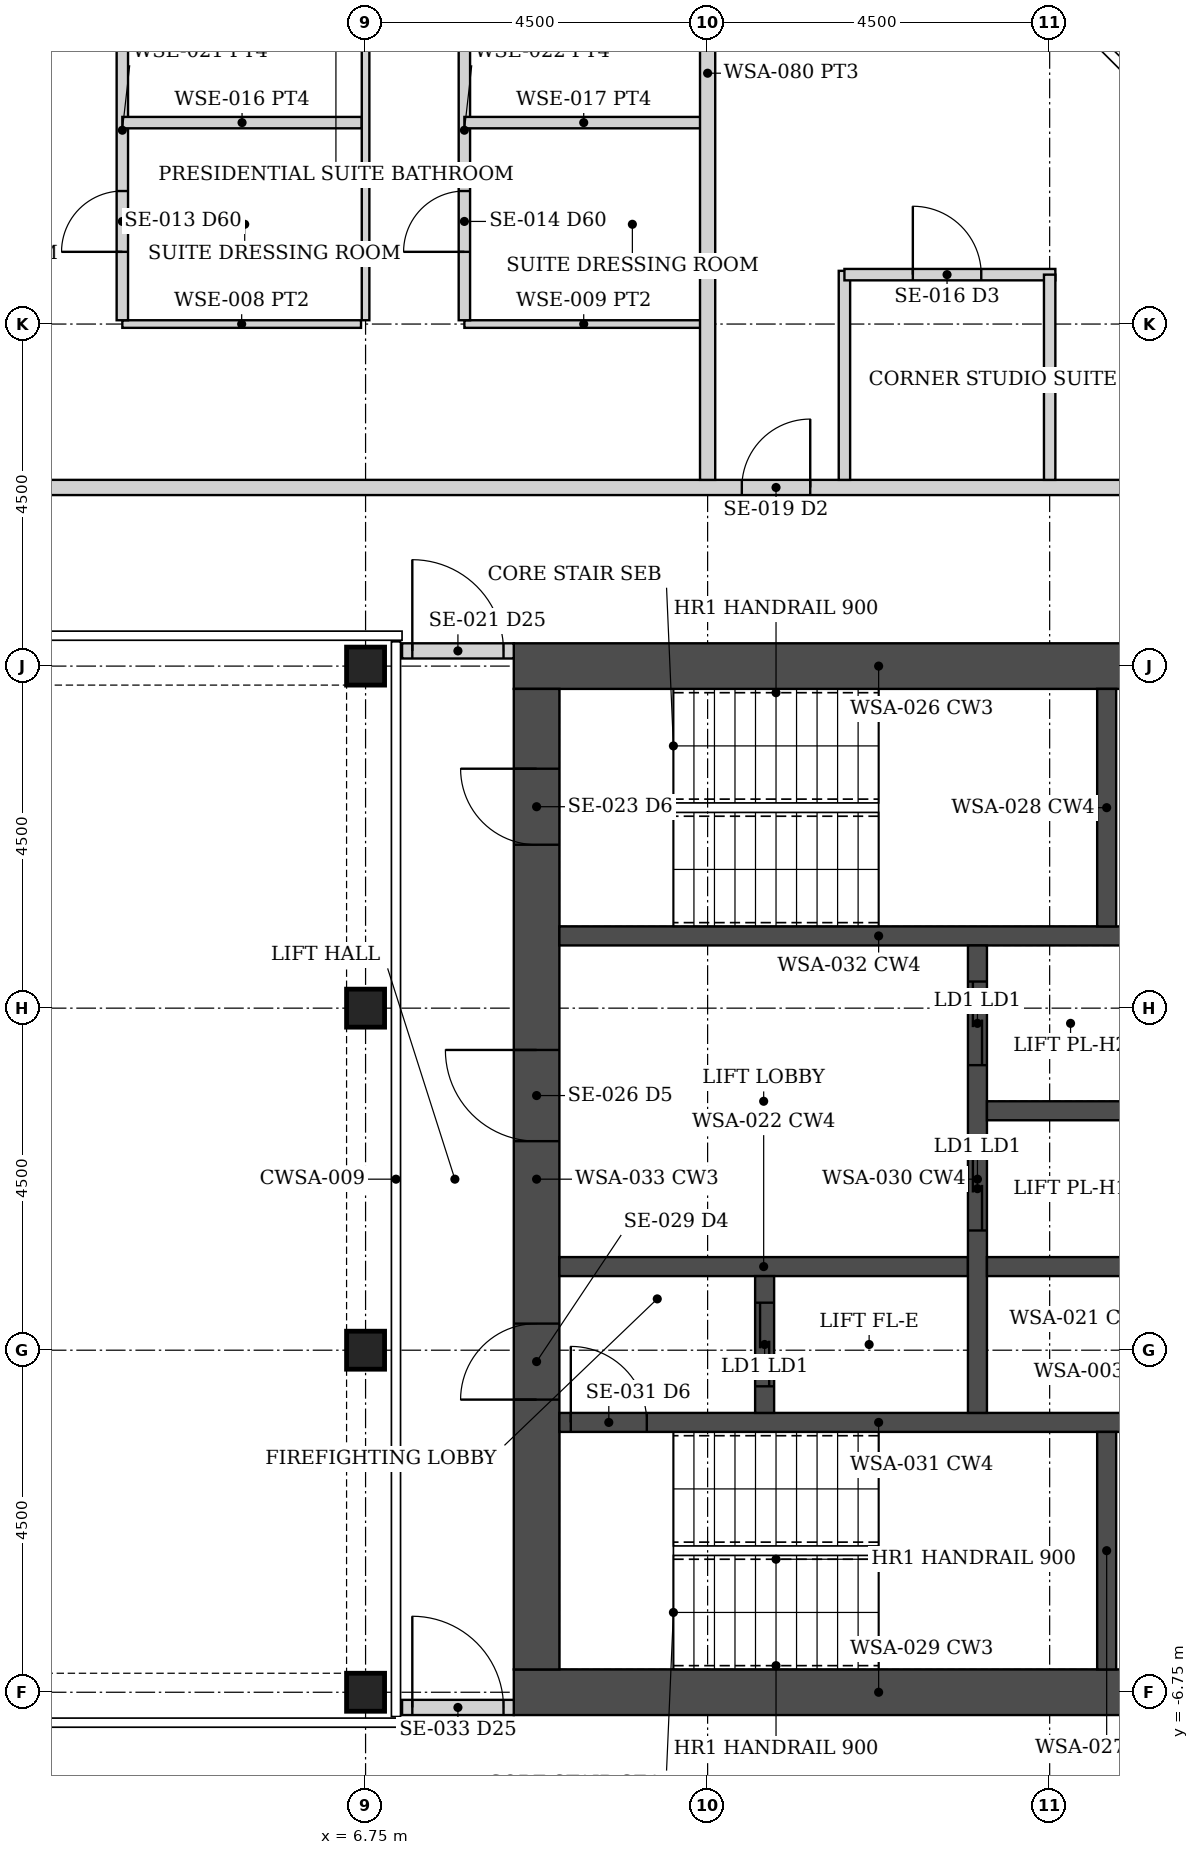
"""IFC4 building model, lengths in metres.
Left out: names, types, materials, properties, quantities, classifications, styles, units other than length and angle.
Written with IfcOpenShell. Run it as: python <this file> out.ifc"""

import sys

from ifc_helpers import new_model, si_unit, direction, frame, frame_2d, origin, origin_2d, place, context, subcontext, project, spatial, rectangle, hollow_rectangle, extrude, element, fill, save


model = new_model("IFC4")
c1 = context("Model", 3, precision=1e-05, world=origin(), true_north=direction((0.0, 1.0)))
c2 = subcontext(c1, "Body", "Model", "MODEL_VIEW")
j1 = project(units=[si_unit("LENGTHUNIT", "METRE"), si_unit("PLANEANGLEUNIT", "RADIAN")], contexts=[c1])
p1 = place(None, origin())
s1 = spatial("IfcSite", under=j1, at=p1, CompositionType="ELEMENT")
p2 = place(p1, origin())
s2 = spatial("IfcBuilding", under=s1, at=p2, CompositionType="ELEMENT")
p3 = place(p2, frame((0.0, 0.0, 245.8)))
s3 = spatial("IfcBuildingStorey", under=s2, at=p3, CompositionType="ELEMENT", Elevation=245.8)
for number, where, z_axis, x_axis in (
    (1, (6.75, -6.75, 0.0), (0.0, 0.0, 1.0), (1.0, 0.0, 0.0)),
    (2, (6.75, -2.25, 0.0), (0.0, 0.0, 1.0), (1.0, 0.0, 0.0)),
    (3, (6.75, 2.25, 0.0), (0.0, 0.0, 1.0), (1.0, 0.0, 0.0)),
    (4, (6.75, 6.75, 0.0), (0.0, 0.0, 1.0), (1.0, 0.0, 0.0)),
):
    element("IfcColumn", number, at=place(p3, frame(where, z_axis=z_axis, x_axis=x_axis)), inside=s3, PredefinedType="COLUMN", context=c2, shape_type="SweptSolid", body=[
        extrude(hollow_rectangle(XDim=0.5, YDim=0.5, WallThickness=0.025, at=origin_2d()), origin(), (0.0, 0.0, 1.0), 3.75),
    ])
for number, where, z_axis, x_axis in (
    (5, (8.7, -6.75, 0.0), (0.0, 0.0, 1.0), (1.0, 0.0, 0.0)),
    (6, (8.7, 6.75, 0.0), (0.0, 0.0, 1.0), (1.0, 0.0, 0.0)),
):
    element("IfcWall", number, at=place(p3, frame(where, z_axis=z_axis, x_axis=x_axis)), inside=s3, PredefinedType="SHEAR", context=c2, shape_type="SweptSolid", body=[
        extrude(rectangle(XDim=9.6, YDim=0.6, at=frame_2d((4.8, 0.0))), origin(), (0.0, 0.0, 1.0), 3.75),
    ])
p4 = place(p3, frame((9.0, -6.45, 0.0), z_axis=(0.0, 0.0, 1.0), x_axis=(0.0, 1.0, 0.0)))
e7 = element("IfcWall", 7, at=p4, inside=s3, PredefinedType="SHEAR", context=c2, shape_type="SweptSolid", body=[
    extrude(rectangle(XDim=12.9, YDim=0.6, at=frame_2d((6.45, 0.0))), origin(), (0.0, 0.0, 1.0), 3.75),
])
p5 = place(p4, frame((3.55, 0.0, 0.0)))
e8 = element("IfcOpeningElement", 8, at=p5, cuts=e7, PredefinedType="OPENING", context=c2, shape_type="SweptSolid", body=[
    extrude(rectangle(XDim=1.0, YDim=2.1, at=frame_2d((0.5, 1.05))), frame((0.0, 0.31, 0.0), z_axis=(0.0, -1.0, 0.0), x_axis=(1.0, 0.0, 0.0)), (0.0, 0.0, 1.0), 0.62),
])
p6 = place(p4, frame((6.95, 0.0, 0.0)))
e9 = element("IfcOpeningElement", 9, at=p6, cuts=e7, PredefinedType="OPENING", context=c2, shape_type="SweptSolid", body=[
    extrude(rectangle(XDim=1.2, YDim=2.1, at=frame_2d((0.6, 1.05))), frame((0.0, 0.31, 0.0), z_axis=(0.0, -1.0, 0.0), x_axis=(1.0, 0.0, 0.0)), (0.0, 0.0, 1.0), 0.62),
])
p7 = place(p4, frame((10.85, 0.0, 0.0)))
e10 = element("IfcOpeningElement", 10, at=p7, cuts=e7, PredefinedType="OPENING", context=c2, shape_type="SweptSolid", body=[
    extrude(rectangle(XDim=1.0, YDim=2.1, at=frame_2d((0.5, 1.05))), frame((0.0, 0.31, 0.0), z_axis=(0.0, -1.0, 0.0), x_axis=(1.0, 0.0, 0.0)), (0.0, 0.0, 1.0), 0.62),
])
p8 = place(p3, frame((9.3, -3.2, 0.0), z_axis=(0.0, 0.0, 1.0), x_axis=(1.0, 0.0, 0.0)))
e11 = element("IfcWall", 11, at=p8, inside=s3, PredefinedType="SHEAR", context=c2, shape_type="SweptSolid", body=[
    extrude(rectangle(XDim=8.4, YDim=0.25, at=frame_2d((4.2, 0.0))), origin(), (0.0, 0.0, 1.0), 3.75),
])
p9 = place(p8, frame((0.15, 0.0, 0.0)))
e12 = element("IfcOpeningElement", 12, at=p9, cuts=e11, PredefinedType="OPENING", context=c2, shape_type="SweptSolid", body=[
    extrude(rectangle(XDim=1.0, YDim=2.1, at=frame_2d((0.5, 1.05))), frame((0.0, 0.135, 0.0), z_axis=(0.0, -1.0, 0.0), x_axis=(1.0, 0.0, 0.0)), (0.0, 0.0, 1.0), 0.27),
])
p10 = place(p3, frame((9.3, 3.2, 0.0), z_axis=(0.0, 0.0, 1.0), x_axis=(1.0, 0.0, 0.0)))
e13 = element("IfcWall", 13, at=p10, inside=s3, PredefinedType="SHEAR", context=c2, shape_type="SweptSolid", body=[
    extrude(rectangle(XDim=8.4, YDim=0.25, at=frame_2d((4.2, 0.0))), origin(), (0.0, 0.0, 1.0), 3.75),
])
for number, where, z_axis, x_axis in (
    (14, (16.5, -6.45, 0.0), (0.0, 0.0, 1.0), (0.0, 1.0, 0.0)),
    (15, (16.5, 3.325, 0.0), (0.0, 0.0, 1.0), (0.0, 1.0, 0.0)),
):
    element("IfcWall", number, at=place(p3, frame(where, z_axis=z_axis, x_axis=x_axis)), inside=s3, PredefinedType="SHEAR", context=c2, shape_type="SweptSolid", body=[
        extrude(rectangle(XDim=3.125, YDim=0.25, at=frame_2d((1.562, 0.0))), origin(), (0.0, 0.0, 1.0), 3.75),
    ])
p11 = place(p3, frame((9.3, -1.15, 0.0), z_axis=(0.0, 0.0, 1.0), x_axis=(1.0, 0.0, 0.0)))
e16 = element("IfcWall", 16, at=p11, inside=s3, PredefinedType="SHEAR", context=c2, shape_type="SweptSolid", body=[
    extrude(rectangle(XDim=5.375, YDim=0.25, at=frame_2d((2.688, 0.0))), origin(), (0.0, 0.0, 1.0), 3.75),
])
p12 = place(p3, frame((12.0, -3.075, 0.0), z_axis=(0.0, 0.0, 1.0), x_axis=(0.0, 1.0, 0.0)))
e17 = element("IfcWall", 17, at=p12, inside=s3, PredefinedType="SHEAR", context=c2, shape_type="SweptSolid", body=[
    extrude(rectangle(XDim=1.8, YDim=0.25, at=frame_2d((0.9, 0.0))), origin(), (0.0, 0.0, 1.0), 3.75),
])
p13 = place(p12, frame((0.35, 0.0, 0.0)))
e18 = element("IfcOpeningElement", 18, at=p13, cuts=e17, PredefinedType="OPENING", context=c2, shape_type="SweptSolid", body=[
    extrude(rectangle(XDim=1.1, YDim=2.1, at=frame_2d((0.55, 1.05))), frame((0.0, 0.135, 0.0), z_axis=(0.0, -1.0, 0.0), x_axis=(1.0, 0.0, 0.0)), (0.0, 0.0, 1.0), 0.27),
])
p14 = place(p3, frame((14.8, -3.075, 0.0), z_axis=(0.0, 0.0, 1.0), x_axis=(0.0, 1.0, 0.0)))
e19 = element("IfcWall", 19, at=p14, inside=s3, PredefinedType="SHEAR", context=c2, shape_type="SweptSolid", body=[
    extrude(rectangle(XDim=6.15, YDim=0.25, at=frame_2d((3.075, 0.0))), origin(), (0.0, 0.0, 1.0), 3.75),
])
p15 = place(p14, frame((2.4, 0.0, 0.0)))
e20 = element("IfcOpeningElement", 20, at=p15, cuts=e19, PredefinedType="OPENING", context=c2, shape_type="SweptSolid", body=[
    extrude(rectangle(XDim=1.1, YDim=2.1, at=frame_2d((0.55, 1.05))), frame((0.0, 0.135, 0.0), z_axis=(0.0, -1.0, 0.0), x_axis=(1.0, 0.0, 0.0)), (0.0, 0.0, 1.0), 0.27),
])
p16 = place(p14, frame((4.575, 0.0, 0.0)))
e21 = element("IfcOpeningElement", 21, at=p16, cuts=e19, PredefinedType="OPENING", context=c2, shape_type="SweptSolid", body=[
    extrude(rectangle(XDim=1.1, YDim=2.1, at=frame_2d((0.55, 1.05))), frame((0.0, 0.135, 0.0), z_axis=(0.0, -1.0, 0.0), x_axis=(1.0, 0.0, 0.0)), (0.0, 0.0, 1.0), 0.27),
])
for number, where, z_axis, x_axis in (
    (22, (14.925, -1.15, 0.0), (0.0, 0.0, 1.0), (1.0, 0.0, 0.0)),
    (23, (14.925, 0.9, 0.0), (0.0, 0.0, 1.0), (1.0, 0.0, 0.0)),
):
    element("IfcWall", number, at=place(p3, frame(where, z_axis=z_axis, x_axis=x_axis)), inside=s3, PredefinedType="SHEAR", context=c2, shape_type="SweptSolid", body=[
        extrude(rectangle(XDim=2.775, YDim=0.25, at=frame_2d((1.387, 0.0))), origin(), (0.0, 0.0, 1.0), 3.75),
    ])
p17 = place(p3, frame((7.23, 6.95, 0.0), z_axis=(0.0, 0.0, 1.0), x_axis=(1.0, 0.0, 0.0)))
e24 = element("IfcWall", 24, at=p17, inside=s3, PredefinedType="PARTITIONING", context=c2, shape_type="SweptSolid", body=[
    extrude(rectangle(XDim=1.47, YDim=0.2, at=frame_2d((0.735, 0.0))), origin(), (0.0, 0.0, 1.0), 2.629),
])
p18 = place(p17, frame((0.135, 0.0, 0.0)))
e25 = element("IfcOpeningElement", 25, at=p18, cuts=e24, PredefinedType="OPENING", context=c2, shape_type="SweptSolid", body=[
    extrude(rectangle(XDim=1.2, YDim=2.1, at=frame_2d((0.6, 1.05))), frame((0.0, 0.11, 0.0), z_axis=(0.0, -1.0, 0.0), x_axis=(1.0, 0.0, 0.0)), (0.0, 0.0, 1.0), 0.22),
])
p19 = place(p3, frame((7.23, -6.95, 0.0), z_axis=(0.0, 0.0, 1.0), x_axis=(1.0, 0.0, 0.0)))
e26 = element("IfcWall", 26, at=p19, inside=s3, PredefinedType="PARTITIONING", context=c2, shape_type="SweptSolid", body=[
    extrude(rectangle(XDim=1.47, YDim=0.2, at=frame_2d((0.735, 0.0))), origin(), (0.0, 0.0, 1.0), 2.629),
])
p20 = place(p19, frame((0.135, 0.0, 0.0)))
e27 = element("IfcOpeningElement", 27, at=p20, cuts=e26, PredefinedType="OPENING", context=c2, shape_type="SweptSolid", body=[
    extrude(rectangle(XDim=1.2, YDim=2.1, at=frame_2d((0.6, 1.05))), frame((0.0, 0.11, 0.0), z_axis=(0.0, -1.0, 0.0), x_axis=(1.0, 0.0, 0.0)), (0.0, 0.0, 1.0), 0.22),
])
p21 = place(p3, frame((-20.05, 9.1, 0.0), z_axis=(0.0, 0.0, 1.0), x_axis=(1.0, 0.0, 0.0)))
e28 = element("IfcWall", 28, at=p21, inside=s3, PredefinedType="PARTITIONING", context=c2, shape_type="SweptSolid", body=[
    extrude(rectangle(XDim=40.1, YDim=0.2, at=frame_2d((20.05, 0.0))), origin(), (0.0, 0.0, 1.0), 2.629),
])
p22 = place(p21, frame((9.1, 0.0, 0.0)))
e29 = element("IfcOpeningElement", 29, at=p22, cuts=e28, PredefinedType="OPENING", context=c2, shape_type="SweptSolid", body=[
    extrude(rectangle(XDim=0.9, YDim=2.1, at=frame_2d((0.45, 1.05))), frame((0.0, 0.11, 0.0), z_axis=(0.0, -1.0, 0.0), x_axis=(1.0, 0.0, 0.0)), (0.0, 0.0, 1.0), 0.22),
])
p23 = place(p21, frame((31.75, 0.0, 0.0)))
e30 = element("IfcOpeningElement", 30, at=p23, cuts=e28, PredefinedType="OPENING", context=c2, shape_type="SweptSolid", body=[
    extrude(rectangle(XDim=0.9, YDim=2.1, at=frame_2d((0.45, 1.05))), frame((0.0, 0.11, 0.0), z_axis=(0.0, -1.0, 0.0), x_axis=(1.0, 0.0, 0.0)), (0.0, 0.0, 1.0), 0.22),
])
p24 = place(p21, frame((7.45, 0.0, 0.0)))
e31 = element("IfcOpeningElement", 31, at=p24, cuts=e28, PredefinedType="OPENING", context=c2, shape_type="SweptSolid", body=[
    extrude(rectangle(XDim=0.9, YDim=2.1, at=frame_2d((0.45, 1.05))), frame((0.0, 0.11, 0.0), z_axis=(0.0, -1.0, 0.0), x_axis=(1.0, 0.0, 0.0)), (0.0, 0.0, 1.0), 0.22),
])
p25 = place(p3, frame((3.55, 11.25, 0.0), z_axis=(0.0, 0.0, 1.0), x_axis=(1.0, 0.0, 0.0)))
e32 = element("IfcWall", 32, at=p25, inside=s3, PredefinedType="PARTITIONING", context=c2, shape_type="SweptSolid", body=[
    extrude(rectangle(XDim=3.14, YDim=0.1, at=frame_2d((1.57, 0.0))), origin(), (0.0, 0.0, 1.0), 2.629),
])
p26 = place(p3, frame((3.55, 11.3, 0.0), z_axis=(0.0, 0.0, 1.0), x_axis=(0.0, 1.0, 0.0)))
e33 = element("IfcWall", 33, at=p26, inside=s3, PredefinedType="PARTITIONING", context=c2, shape_type="SweptSolid", body=[
    extrude(rectangle(XDim=5.0, YDim=0.15, at=frame_2d((2.5, 0.0))), origin(), (0.0, 0.0, 1.0), 2.629),
])
p27 = place(p26, frame((0.9, 0.0, 0.0)))
e34 = element("IfcOpeningElement", 34, at=p27, cuts=e33, PredefinedType="OPENING", context=c2, shape_type="SweptSolid", body=[
    extrude(rectangle(XDim=0.8, YDim=2.1, at=frame_2d((0.4, 1.05))), frame((0.0, 0.085, 0.0), z_axis=(0.0, -1.0, 0.0), x_axis=(1.0, 0.0, 0.0)), (0.0, 0.0, 1.0), 0.17),
])
p28 = place(p3, frame((3.55, 13.9, 0.0), z_axis=(0.0, 0.0, 1.0), x_axis=(1.0, 0.0, 0.0)))
e35 = element("IfcWall", 35, at=p28, inside=s3, PredefinedType="PARTITIONING", context=c2, shape_type="SweptSolid", body=[
    extrude(rectangle(XDim=3.15, YDim=0.15, at=frame_2d((1.575, 0.0))), origin(), (0.0, 0.0, 1.0), 2.629),
])
p29 = place(p3, frame((6.75, 11.3, 0.0), z_axis=(0.0, 0.0, 1.0), x_axis=(0.0, 1.0, 0.0)))
e36 = element("IfcWall", 36, at=p29, inside=s3, PredefinedType="PARTITIONING", context=c2, shape_type="SweptSolid", body=[
    extrude(rectangle(XDim=8.6, YDim=0.1, at=frame_2d((4.3, 0.0))), origin(), (0.0, 0.0, 1.0), 2.629),
])
p30 = place(p3, frame((8.05, 11.25, 0.0), z_axis=(0.0, 0.0, 1.0), x_axis=(1.0, 0.0, 0.0)))
e37 = element("IfcWall", 37, at=p30, inside=s3, PredefinedType="PARTITIONING", context=c2, shape_type="SweptSolid", body=[
    extrude(rectangle(XDim=3.14, YDim=0.1, at=frame_2d((1.57, 0.0))), origin(), (0.0, 0.0, 1.0), 2.629),
])
p31 = place(p3, frame((8.05, 11.3, 0.0), z_axis=(0.0, 0.0, 1.0), x_axis=(0.0, 1.0, 0.0)))
e38 = element("IfcWall", 38, at=p31, inside=s3, PredefinedType="PARTITIONING", context=c2, shape_type="SweptSolid", body=[
    extrude(rectangle(XDim=5.0, YDim=0.15, at=frame_2d((2.5, 0.0))), origin(), (0.0, 0.0, 1.0), 2.629),
])
p32 = place(p31, frame((0.9, 0.0, 0.0)))
e39 = element("IfcOpeningElement", 39, at=p32, cuts=e38, PredefinedType="OPENING", context=c2, shape_type="SweptSolid", body=[
    extrude(rectangle(XDim=0.8, YDim=2.1, at=frame_2d((0.4, 1.05))), frame((0.0, 0.085, 0.0), z_axis=(0.0, -1.0, 0.0), x_axis=(1.0, 0.0, 0.0)), (0.0, 0.0, 1.0), 0.17),
])
p33 = place(p3, frame((8.05, 13.9, 0.0), z_axis=(0.0, 0.0, 1.0), x_axis=(1.0, 0.0, 0.0)))
e40 = element("IfcWall", 40, at=p33, inside=s3, PredefinedType="PARTITIONING", context=c2, shape_type="SweptSolid", body=[
    extrude(rectangle(XDim=3.14, YDim=0.15, at=frame_2d((1.57, 0.0))), origin(), (0.0, 0.0, 1.0), 2.629),
])
p34 = place(p3, frame((11.25, 9.2, 0.0), z_axis=(0.0, 0.0, 1.0), x_axis=(0.0, 1.0, 0.0)))
e41 = element("IfcWall", 41, at=p34, inside=s3, PredefinedType="PARTITIONING", context=c2, shape_type="SweptSolid", body=[
    extrude(rectangle(XDim=10.7, YDim=0.2, at=frame_2d((5.35, 0.0))), origin(), (0.0, 0.0, 1.0), 2.629),
])
p35 = place(p3, frame((13.05, 9.2, 0.0), z_axis=(0.0, 0.0, 1.0), x_axis=(0.0, 1.0, 0.0)))
e42 = element("IfcWall", 42, at=p35, inside=s3, PredefinedType="PARTITIONING", context=c2, shape_type="SweptSolid", body=[
    extrude(rectangle(XDim=2.75, YDim=0.15, at=frame_2d((1.375, 0.0))), origin(), (0.0, 0.0, 1.0), 2.629),
])
p36 = place(p3, frame((13.05, 11.9, 0.0), z_axis=(0.0, 0.0, 1.0), x_axis=(1.0, 0.0, 0.0)))
e43 = element("IfcWall", 43, at=p36, inside=s3, PredefinedType="PARTITIONING", context=c2, shape_type="SweptSolid", body=[
    extrude(rectangle(XDim=2.775, YDim=0.15, at=frame_2d((1.387, 0.0))), origin(), (0.0, 0.0, 1.0), 2.629),
])
p37 = place(p36, frame((0.9, 0.0, 0.0)))
e44 = element("IfcOpeningElement", 44, at=p37, cuts=e43, PredefinedType="OPENING", context=c2, shape_type="SweptSolid", body=[
    extrude(rectangle(XDim=0.9, YDim=2.1, at=frame_2d((0.45, 1.05))), frame((0.0, 0.085, 0.0), z_axis=(0.0, -1.0, 0.0), x_axis=(1.0, 0.0, 0.0)), (0.0, 0.0, 1.0), 0.17),
])
p38 = place(p3, frame((15.75, 9.2, 0.0), z_axis=(0.0, 0.0, 1.0), x_axis=(0.0, 1.0, 0.0)))
e45 = element("IfcWall", 45, at=p38, inside=s3, PredefinedType="PARTITIONING", context=c2, shape_type="SweptSolid", body=[
    extrude(rectangle(XDim=2.7, YDim=0.15, at=frame_2d((1.35, 0.0))), origin(), (0.0, 0.0, 1.0), 2.629),
])
p39 = place(p18, origin())
e46 = element("IfcDoor", 46, at=p39, inside=s3, OperationType="DOUBLE_DOOR_DOUBLE_SWING", PredefinedType="DOOR", context=c2, shape_type="SweptSolid", body=[
    extrude(rectangle(XDim=1.2, YDim=2.1, at=frame_2d((0.6, 1.05))), frame((0.0, 0.025, 0.0), z_axis=(0.0, -1.0, 0.0), x_axis=(1.0, 0.0, 0.0)), (0.0, 0.0, 1.0), 0.05),
])
fill(e25, e46)
p40 = place(p20, origin())
e47 = element("IfcDoor", 47, at=p40, inside=s3, OperationType="DOUBLE_DOOR_DOUBLE_SWING", PredefinedType="DOOR", context=c2, shape_type="SweptSolid", body=[
    extrude(rectangle(XDim=1.2, YDim=2.1, at=frame_2d((0.6, 1.05))), frame((0.0, 0.025, 0.0), z_axis=(0.0, -1.0, 0.0), x_axis=(1.0, 0.0, 0.0)), (0.0, 0.0, 1.0), 0.05),
])
fill(e27, e47)
p41 = place(p27, origin())
e48 = element("IfcDoor", 48, at=p41, inside=s3, OperationType="SINGLE_SWING_LEFT", PredefinedType="DOOR", context=c2, shape_type="SweptSolid", body=[
    extrude(rectangle(XDim=0.8, YDim=2.1, at=frame_2d((0.4, 1.05))), frame((0.0, 0.025, 0.0), z_axis=(0.0, -1.0, 0.0), x_axis=(1.0, 0.0, 0.0)), (0.0, 0.0, 1.0), 0.05),
])
fill(e34, e48)
p42 = place(p32, origin())
e49 = element("IfcDoor", 49, at=p42, inside=s3, OperationType="SINGLE_SWING_LEFT", PredefinedType="DOOR", context=c2, shape_type="SweptSolid", body=[
    extrude(rectangle(XDim=0.8, YDim=2.1, at=frame_2d((0.4, 1.05))), frame((0.0, 0.025, 0.0), z_axis=(0.0, -1.0, 0.0), x_axis=(1.0, 0.0, 0.0)), (0.0, 0.0, 1.0), 0.05),
])
fill(e39, e49)
p43 = place(p23, origin())
e50 = element("IfcDoor", 50, at=p43, inside=s3, OperationType="SINGLE_SWING_RIGHT", PredefinedType="DOOR", context=c2, shape_type="SweptSolid", body=[
    extrude(rectangle(XDim=0.9, YDim=2.1, at=frame_2d((0.45, 1.05))), frame((0.0, 0.025, 0.0), z_axis=(0.0, -1.0, 0.0), x_axis=(1.0, 0.0, 0.0)), (0.0, 0.0, 1.0), 0.05),
])
fill(e30, e50)
p44 = place(p37, origin())
e51 = element("IfcDoor", 51, at=p44, inside=s3, OperationType="SINGLE_SWING_LEFT", PredefinedType="DOOR", context=c2, shape_type="SweptSolid", body=[
    extrude(rectangle(XDim=0.9, YDim=2.1, at=frame_2d((0.45, 1.05))), frame((0.0, 0.025, 0.0), z_axis=(0.0, -1.0, 0.0), x_axis=(1.0, 0.0, 0.0)), (0.0, 0.0, 1.0), 0.05),
])
fill(e44, e51)
p45 = place(p5, origin())
e52 = element("IfcDoor", 52, at=p45, inside=s3, OperationType="SINGLE_SWING_LEFT", PredefinedType="DOOR", context=c2, shape_type="SweptSolid", body=[
    extrude(rectangle(XDim=1.0, YDim=2.1, at=frame_2d((0.5, 1.05))), frame((0.0, 0.025, 0.0), z_axis=(0.0, -1.0, 0.0), x_axis=(1.0, 0.0, 0.0)), (0.0, 0.0, 1.0), 0.05),
])
fill(e8, e52)
p46 = place(p9, origin())
e53 = element("IfcDoor", 53, at=p46, inside=s3, OperationType="SINGLE_SWING_LEFT", PredefinedType="DOOR", context=c2, shape_type="SweptSolid", body=[
    extrude(rectangle(XDim=1.0, YDim=2.1, at=frame_2d((0.5, 1.05))), frame((0.0, 0.025, 0.0), z_axis=(0.0, -1.0, 0.0), x_axis=(1.0, 0.0, 0.0)), (0.0, 0.0, 1.0), 0.05),
])
fill(e12, e53)
p47 = place(p6, origin())
e54 = element("IfcDoor", 54, at=p47, inside=s3, OperationType="SINGLE_SWING_RIGHT", PredefinedType="DOOR", context=c2, shape_type="SweptSolid", body=[
    extrude(rectangle(XDim=1.2, YDim=2.1, at=frame_2d((0.6, 1.05))), frame((0.0, 0.025, 0.0), z_axis=(0.0, -1.0, 0.0), x_axis=(1.0, 0.0, 0.0)), (0.0, 0.0, 1.0), 0.05),
])
fill(e9, e54)
p48 = place(p7, origin())
e55 = element("IfcDoor", 55, at=p48, inside=s3, OperationType="SINGLE_SWING_RIGHT", PredefinedType="DOOR", context=c2, shape_type="SweptSolid", body=[
    extrude(rectangle(XDim=1.0, YDim=2.1, at=frame_2d((0.5, 1.05))), frame((0.0, 0.025, 0.0), z_axis=(0.0, -1.0, 0.0), x_axis=(1.0, 0.0, 0.0)), (0.0, 0.0, 1.0), 0.05),
])
fill(e10, e55)
p49 = place(p13, origin())
e56 = element("IfcDoor", 56, at=p49, inside=s3, OperationType="DOUBLE_DOOR_SLIDING", PredefinedType="DOOR", context=c2, shape_type="SweptSolid", body=[
    extrude(rectangle(XDim=1.1, YDim=2.1, at=frame_2d((0.55, 1.05))), frame((0.0, 0.025, 0.0), z_axis=(0.0, -1.0, 0.0), x_axis=(1.0, 0.0, 0.0)), (0.0, 0.0, 1.0), 0.05),
])
fill(e18, e56)
p50 = place(p15, origin())
e57 = element("IfcDoor", 57, at=p50, inside=s3, OperationType="DOUBLE_DOOR_SLIDING", PredefinedType="DOOR", context=c2, shape_type="SweptSolid", body=[
    extrude(rectangle(XDim=1.1, YDim=2.1, at=frame_2d((0.55, 1.05))), frame((0.0, 0.025, 0.0), z_axis=(0.0, -1.0, 0.0), x_axis=(1.0, 0.0, 0.0)), (0.0, 0.0, 1.0), 0.05),
])
fill(e20, e57)
p51 = place(p16, origin())
e58 = element("IfcDoor", 58, at=p51, inside=s3, OperationType="DOUBLE_DOOR_SLIDING", PredefinedType="DOOR", context=c2, shape_type="SweptSolid", body=[
    extrude(rectangle(XDim=1.1, YDim=2.1, at=frame_2d((0.55, 1.05))), frame((0.0, 0.025, 0.0), z_axis=(0.0, -1.0, 0.0), x_axis=(1.0, 0.0, 0.0)), (0.0, 0.0, 1.0), 0.05),
])
fill(e21, e58)
save(model, sys.argv[1])
